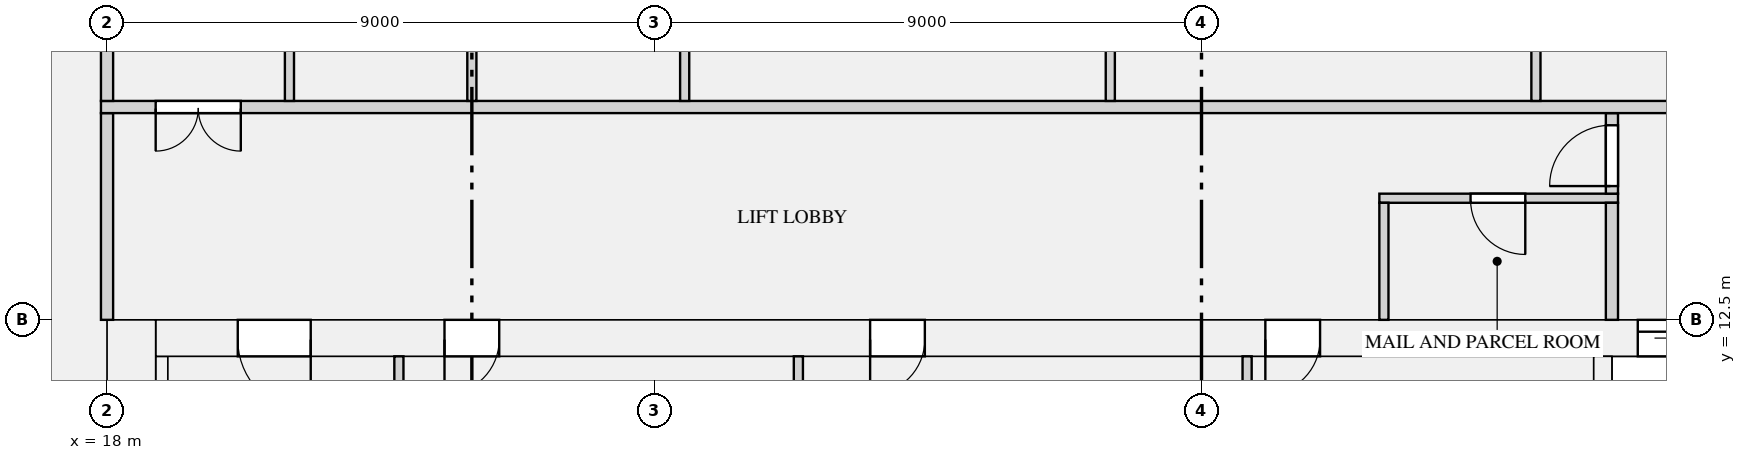
"""IFC4 building model, lengths in metres.
Left out: names, types, materials, properties, quantities, classifications, styles, units other than length and angle.
Written with IfcOpenShell. Run it as: python <this file> out.ifc"""

import sys

from ifc_helpers import new_model, si_unit, direction, frame, frame_2d, origin, place, context, subcontext, project, spatial, rectangle, extrude, element, fill, save


model = new_model("IFC4")
c1 = context("Model", 3, precision=1e-05, world=origin(), true_north=direction((0.0, 1.0)))
c2 = subcontext(c1, "Body", "Model", "MODEL_VIEW")
j1 = project(units=[si_unit("LENGTHUNIT", "METRE"), si_unit("PLANEANGLEUNIT", "RADIAN")], contexts=[c1])
p1 = place(None, origin())
s1 = spatial("IfcSite", under=j1, at=p1, CompositionType="ELEMENT")
p2 = place(p1, origin())
s2 = spatial("IfcBuilding", under=s1, at=p2, CompositionType="ELEMENT")
p3 = place(p2, frame((0.0, 0.0, 127.65)))
s3 = spatial("IfcBuildingStorey", under=s2, at=p3, CompositionType="ELEMENT", Elevation=127.65)
p4 = place(p3, frame((18.4, 0.0, 0.0), z_axis=(0.0, 0.0, 1.0), x_axis=(0.0, 1.0, 0.0)))
e1 = element("IfcWall", 1, at=p4, inside=s3, PredefinedType="SHEAR", context=c2, shape_type="SweptSolid", body=[
    extrude(rectangle(XDim=12.5, YDim=0.8, at=frame_2d((6.25, 0.0))), origin(), (0.0, 0.0, 1.0), 3.15),
])
p5 = place(p3, frame((18.8, 12.2, 0.0), z_axis=(0.0, 0.0, 1.0), x_axis=(1.0, 0.0, 0.0)))
e2 = element("IfcWall", 2, at=p5, inside=s3, PredefinedType="SHEAR", context=c2, shape_type="SweptSolid", body=[
    extrude(rectangle(XDim=34.4, YDim=0.6, at=frame_2d((17.2, 0.0))), origin(), (0.0, 0.0, 1.0), 3.15),
])
p6 = place(p5, frame((24.375, 0.0, 0.0)))
e3 = element("IfcOpeningElement", 3, at=p6, cuts=e2, PredefinedType="OPENING", context=c2, shape_type="SweptSolid", body=[
    extrude(rectangle(XDim=1.1, YDim=2.1, at=frame_2d((0.55, 1.05))), frame((0.0, 0.31, 0.0), z_axis=(0.0, -1.0, 0.0), x_axis=(1.0, 0.0, 0.0)), (0.0, 0.0, 1.0), 0.62),
])
p7 = place(p5, frame((26.625, 0.0, 0.0)))
e4 = element("IfcOpeningElement", 4, at=p7, cuts=e2, PredefinedType="OPENING", context=c2, shape_type="SweptSolid", body=[
    extrude(rectangle(XDim=1.1, YDim=2.1, at=frame_2d((0.55, 1.05))), frame((0.0, 0.31, 0.0), z_axis=(0.0, -1.0, 0.0), x_axis=(1.0, 0.0, 0.0)), (0.0, 0.0, 1.0), 0.62),
])
p8 = place(p5, frame((28.875, 0.0, 0.0)))
e5 = element("IfcOpeningElement", 5, at=p8, cuts=e2, PredefinedType="OPENING", context=c2, shape_type="SweptSolid", body=[
    extrude(rectangle(XDim=1.1, YDim=2.1, at=frame_2d((0.55, 1.05))), frame((0.0, 0.31, 0.0), z_axis=(0.0, -1.0, 0.0), x_axis=(1.0, 0.0, 0.0)), (0.0, 0.0, 1.0), 0.62),
])
p9 = place(p5, frame((4.75, 0.0, 0.0)))
e6 = element("IfcOpeningElement", 6, at=p9, cuts=e2, PredefinedType="OPENING", context=c2, shape_type="SweptSolid", body=[
    extrude(rectangle(XDim=0.9, YDim=2.1, at=frame_2d((0.45, 1.05))), frame((0.0, 0.31, 0.0), z_axis=(0.0, -1.0, 0.0), x_axis=(1.0, 0.0, 0.0)), (0.0, 0.0, 1.0), 0.62),
])
p10 = place(p5, frame((11.75, 0.0, 0.0)))
e7 = element("IfcOpeningElement", 7, at=p10, cuts=e2, PredefinedType="OPENING", context=c2, shape_type="SweptSolid", body=[
    extrude(rectangle(XDim=0.9, YDim=2.1, at=frame_2d((0.45, 1.05))), frame((0.0, 0.31, 0.0), z_axis=(0.0, -1.0, 0.0), x_axis=(1.0, 0.0, 0.0)), (0.0, 0.0, 1.0), 0.62),
])
p11 = place(p5, frame((18.25, 0.0, 0.0)))
e8 = element("IfcOpeningElement", 8, at=p11, cuts=e2, PredefinedType="OPENING", context=c2, shape_type="SweptSolid", body=[
    extrude(rectangle(XDim=0.9, YDim=2.1, at=frame_2d((0.45, 1.05))), frame((0.0, 0.31, 0.0), z_axis=(0.0, -1.0, 0.0), x_axis=(1.0, 0.0, 0.0)), (0.0, 0.0, 1.0), 0.62),
])
p12 = place(p5, frame((1.35, 0.0, 0.0)))
e9 = element("IfcOpeningElement", 9, at=p12, cuts=e2, PredefinedType="OPENING", context=c2, shape_type="SweptSolid", body=[
    extrude(rectangle(XDim=1.2, YDim=2.1, at=frame_2d((0.6, 1.05))), frame((0.0, 0.31, 0.0), z_axis=(0.0, -1.0, 0.0), x_axis=(1.0, 0.0, 0.0)), (0.0, 0.0, 1.0), 0.62),
])
p13 = place(p5, frame((31.85, 0.0, 0.0)))
e10 = element("IfcOpeningElement", 10, at=p13, cuts=e2, PredefinedType="OPENING", context=c2, shape_type="SweptSolid", body=[
    extrude(rectangle(XDim=1.2, YDim=2.1, at=frame_2d((0.6, 1.05))), frame((0.0, 0.31, 0.0), z_axis=(0.0, -1.0, 0.0), x_axis=(1.0, 0.0, 0.0)), (0.0, 0.0, 1.0), 0.62),
])
p14 = place(p3, frame((18.9, 1.0, 0.0), z_axis=(0.0, 0.0, 1.0), x_axis=(0.0, 1.0, 0.0)))
e11 = element("IfcWall", 11, at=p14, inside=s3, PredefinedType="SHEAR", context=c2, shape_type="SweptSolid", body=[
    extrude(rectangle(XDim=10.9, YDim=0.2, at=frame_2d((5.45, 0.0))), origin(), (0.0, 0.0, 1.0), 3.15),
])
p15 = place(p3, frame((42.6, 8.25, 0.0), z_axis=(0.0, 0.0, 1.0), x_axis=(0.0, 1.0, 0.0)))
e12 = element("IfcWall", 12, at=p15, inside=s3, PredefinedType="SHEAR", context=c2, shape_type="SweptSolid", body=[
    extrude(rectangle(XDim=3.65, YDim=0.3, at=frame_2d((1.825, 0.0))), origin(), (0.0, 0.0, 1.0), 3.15),
])
p16 = place(p3, frame((38.925, 14.5, 0.0), z_axis=(0.0, 0.0, 1.0), x_axis=(1.0, 0.0, 0.0)))
e13 = element("IfcWall", 13, at=p16, inside=s3, PredefinedType="PARTITIONING", context=c2, shape_type="SweptSolid", body=[
    extrude(rectangle(XDim=3.925, YDim=0.15, at=frame_2d((1.962, 0.0))), origin(), (0.0, 0.0, 1.0), 2.65),
])
p17 = place(p16, frame((1.5, 0.0, 0.0)))
e14 = element("IfcOpeningElement", 14, at=p17, cuts=e13, PredefinedType="OPENING", context=c2, shape_type="SweptSolid", body=[
    extrude(rectangle(XDim=0.9, YDim=2.1, at=frame_2d((0.45, 1.05))), frame((0.0, 0.085, 0.0), z_axis=(0.0, -1.0, 0.0), x_axis=(1.0, 0.0, 0.0)), (0.0, 0.0, 1.0), 0.17),
])
for number, where, z_axis, x_axis in (
    (15, (22.8, 9.505, 0.0), (0.0, 0.0, 1.0), (0.0, 1.0, 0.0)),
    (16, (29.37, 9.505, 0.0), (0.0, 0.0, 1.0), (0.0, 1.0, 0.0)),
    (17, (36.75, 9.505, 0.0), (0.0, 0.0, 1.0), (0.0, 1.0, 0.0)),
):
    element("IfcWall", number, at=place(p3, frame(where, z_axis=z_axis, x_axis=x_axis)), inside=s3, PredefinedType="PARTITIONING", context=c2, shape_type="SweptSolid", body=[
        extrude(rectangle(XDim=2.395, YDim=0.15, at=frame_2d((1.198, 0.0))), origin(), (0.0, 0.0, 1.0), 2.65),
    ])
p18 = place(p3, frame((18.0, 12.5, 0.0), z_axis=(0.0, 0.0, 1.0), x_axis=(0.0, 1.0, 0.0)))
e18 = element("IfcWall", 18, at=p18, inside=s3, PredefinedType="PARTITIONING", context=c2, shape_type="SweptSolid", body=[
    extrude(rectangle(XDim=3.4, YDim=0.2, at=frame_2d((1.7, 0.0))), origin(), (0.0, 0.0, 1.0), 2.65),
])
p19 = place(p3, frame((39.0, 12.5, 0.0), z_axis=(0.0, 0.0, 1.0), x_axis=(0.0, 1.0, 0.0)))
e19 = element("IfcWall", 19, at=p19, inside=s3, PredefinedType="PARTITIONING", context=c2, shape_type="SweptSolid", body=[
    extrude(rectangle(XDim=1.925, YDim=0.15, at=frame_2d((0.962, 0.0))), origin(), (0.0, 0.0, 1.0), 2.65),
])
p20 = place(p3, frame((42.75, 12.5, 0.0), z_axis=(0.0, 0.0, 1.0), x_axis=(0.0, 1.0, 0.0)))
e20 = element("IfcWall", 20, at=p20, inside=s3, PredefinedType="PARTITIONING", context=c2, shape_type="SweptSolid", body=[
    extrude(rectangle(XDim=1.925, YDim=0.2, at=frame_2d((0.962, 0.0))), origin(), (0.0, 0.0, 1.0), 2.65),
])
p21 = place(p3, frame((42.75, 14.575, 0.0), z_axis=(0.0, 0.0, 1.0), x_axis=(0.0, 1.0, 0.0)))
e21 = element("IfcWall", 21, at=p21, inside=s3, PredefinedType="PARTITIONING", context=c2, shape_type="SweptSolid", body=[
    extrude(rectangle(XDim=1.325, YDim=0.2, at=frame_2d((0.663, 0.0))), origin(), (0.0, 0.0, 1.0), 2.65),
])
p22 = place(p21, frame((0.125, 0.0, 0.0)))
e22 = element("IfcOpeningElement", 22, at=p22, cuts=e21, PredefinedType="OPENING", context=c2, shape_type="SweptSolid", body=[
    extrude(rectangle(XDim=1.0, YDim=2.1, at=frame_2d((0.5, 1.05))), frame((0.0, 0.11, 0.0), z_axis=(0.0, -1.0, 0.0), x_axis=(1.0, 0.0, 0.0)), (0.0, 0.0, 1.0), 0.22),
])
p23 = place(p3, frame((17.9, 16.0, 0.0), z_axis=(0.0, 0.0, 1.0), x_axis=(1.0, 0.0, 0.0)))
e23 = element("IfcWall", 23, at=p23, inside=s3, PredefinedType="PARTITIONING", context=c2, shape_type="SweptSolid", body=[
    extrude(rectangle(XDim=36.2, YDim=0.2, at=frame_2d((18.1, 0.0))), origin(), (0.0, 0.0, 1.0), 2.65),
])
p24 = place(p23, frame((0.9, 0.0, 0.0)))
e24 = element("IfcOpeningElement", 24, at=p24, cuts=e23, PredefinedType="OPENING", context=c2, shape_type="SweptSolid", body=[
    extrude(rectangle(XDim=1.4, YDim=2.1, at=frame_2d((0.7, 1.05))), frame((0.0, 0.11, 0.0), z_axis=(0.0, -1.0, 0.0), x_axis=(1.0, 0.0, 0.0)), (0.0, 0.0, 1.0), 0.22),
])
p25 = place(p23, frame((33.9, 0.0, 0.0)))
e25 = element("IfcOpeningElement", 25, at=p25, cuts=e23, PredefinedType="OPENING", context=c2, shape_type="SweptSolid", body=[
    extrude(rectangle(XDim=1.4, YDim=2.1, at=frame_2d((0.7, 1.05))), frame((0.0, 0.11, 0.0), z_axis=(0.0, -1.0, 0.0), x_axis=(1.0, 0.0, 0.0)), (0.0, 0.0, 1.0), 0.22),
])
p26 = place(p3, frame((18.0, 16.1, 0.0), z_axis=(0.0, 0.0, 1.0), x_axis=(0.0, 1.0, 0.0)))
e26 = element("IfcWall", 26, at=p26, inside=s3, PredefinedType="PARTITIONING", context=c2, shape_type="SweptSolid", body=[
    extrude(rectangle(XDim=7.8, YDim=0.2, at=frame_2d((3.9, 0.0))), origin(), (0.0, 0.0, 1.0), 2.65),
])
p27 = place(p26, frame((2.35, 0.0, 0.0)))
e27 = element("IfcOpeningElement", 27, at=p27, cuts=e26, PredefinedType="OPENING", context=c2, shape_type="SweptSolid", body=[
    extrude(rectangle(XDim=1.1, YDim=2.1, at=frame_2d((0.55, 1.05))), frame((0.0, 0.11, 0.0), z_axis=(0.0, -1.0, 0.0), x_axis=(1.0, 0.0, 0.0)), (0.0, 0.0, 1.0), 0.22),
])
p28 = place(p3, frame((21.0, 16.1, 0.0), z_axis=(0.0, 0.0, 1.0), x_axis=(0.0, 1.0, 0.0)))
e28 = element("IfcWall", 28, at=p28, inside=s3, PredefinedType="PARTITIONING", context=c2, shape_type="SweptSolid", body=[
    extrude(rectangle(XDim=4.825, YDim=0.15, at=frame_2d((2.413, 0.0))), origin(), (0.0, 0.0, 1.0), 2.65),
])
p29 = place(p28, frame((1.95, 0.0, 0.0)))
e29 = element("IfcOpeningElement", 29, at=p29, cuts=e28, PredefinedType="OPENING", context=c2, shape_type="SweptSolid", body=[
    extrude(rectangle(XDim=0.9, YDim=2.1, at=frame_2d((0.45, 1.05))), frame((0.0, 0.085, 0.0), z_axis=(0.0, -1.0, 0.0), x_axis=(1.0, 0.0, 0.0)), (0.0, 0.0, 1.0), 0.17),
])
for number, where, z_axis, x_axis in (
    (30, (24.0, 16.1, 0.0), (0.0, 0.0, 1.0), (0.0, 1.0, 0.0)),
    (31, (27.5, 16.1, 0.0), (0.0, 0.0, 1.0), (0.0, 1.0, 0.0)),
    (32, (34.5, 16.1, 0.0), (0.0, 0.0, 1.0), (0.0, 1.0, 0.0)),
    (33, (41.5, 16.1, 0.0), (0.0, 0.0, 1.0), (0.0, 1.0, 0.0)),
):
    element("IfcWall", number, at=place(p3, frame(where, z_axis=z_axis, x_axis=x_axis)), inside=s3, PredefinedType="PARTITIONING", context=c2, shape_type="SweptSolid", body=[
        extrude(rectangle(XDim=4.825, YDim=0.15, at=frame_2d((2.413, 0.0))), origin(), (0.0, 0.0, 1.0), 2.65),
    ])
p30 = place(p6, origin())
e34 = element("IfcDoor", 34, at=p30, inside=s3, OperationType="DOUBLE_DOOR_SLIDING", PredefinedType="DOOR", context=c2, shape_type="SweptSolid", body=[
    extrude(rectangle(XDim=1.1, YDim=2.1, at=frame_2d((0.55, 1.05))), frame((0.0, 0.025, 0.0), z_axis=(0.0, -1.0, 0.0), x_axis=(1.0, 0.0, 0.0)), (0.0, 0.0, 1.0), 0.05),
])
fill(e3, e34)
p31 = place(p17, frame((0.9, 0.0, 0.0), z_axis=(0.0, 0.0, 1.0), x_axis=(-1.0, 0.0, 0.0)))
e35 = element("IfcDoor", 35, at=p31, inside=s3, OperationType="SINGLE_SWING_LEFT", PredefinedType="DOOR", context=c2, shape_type="SweptSolid", body=[
    extrude(rectangle(XDim=0.9, YDim=2.1, at=frame_2d((0.45, 1.05))), frame((0.0, 0.025, 0.0), z_axis=(0.0, -1.0, 0.0), x_axis=(1.0, 0.0, 0.0)), (0.0, 0.0, 1.0), 0.05),
])
fill(e14, e35)
p32 = place(p9, frame((0.9, 0.0, 0.0), z_axis=(0.0, 0.0, 1.0), x_axis=(-1.0, 0.0, 0.0)))
e36 = element("IfcDoor", 36, at=p32, inside=s3, OperationType="SINGLE_SWING_RIGHT", PredefinedType="DOOR", context=c2, shape_type="SweptSolid", body=[
    extrude(rectangle(XDim=0.9, YDim=2.1, at=frame_2d((0.45, 1.05))), frame((0.0, 0.025, 0.0), z_axis=(0.0, -1.0, 0.0), x_axis=(1.0, 0.0, 0.0)), (0.0, 0.0, 1.0), 0.05),
])
fill(e6, e36)
p33 = place(p10, frame((0.9, 0.0, 0.0), z_axis=(0.0, 0.0, 1.0), x_axis=(-1.0, 0.0, 0.0)))
e37 = element("IfcDoor", 37, at=p33, inside=s3, OperationType="SINGLE_SWING_RIGHT", PredefinedType="DOOR", context=c2, shape_type="SweptSolid", body=[
    extrude(rectangle(XDim=0.9, YDim=2.1, at=frame_2d((0.45, 1.05))), frame((0.0, 0.025, 0.0), z_axis=(0.0, -1.0, 0.0), x_axis=(1.0, 0.0, 0.0)), (0.0, 0.0, 1.0), 0.05),
])
fill(e7, e37)
p34 = place(p11, frame((0.9, 0.0, 0.0), z_axis=(0.0, 0.0, 1.0), x_axis=(-1.0, 0.0, 0.0)))
e38 = element("IfcDoor", 38, at=p34, inside=s3, OperationType="SINGLE_SWING_RIGHT", PredefinedType="DOOR", context=c2, shape_type="SweptSolid", body=[
    extrude(rectangle(XDim=0.9, YDim=2.1, at=frame_2d((0.45, 1.05))), frame((0.0, 0.025, 0.0), z_axis=(0.0, -1.0, 0.0), x_axis=(1.0, 0.0, 0.0)), (0.0, 0.0, 1.0), 0.05),
])
fill(e8, e38)
p35 = place(p12, frame((1.2, 0.0, 0.0), z_axis=(0.0, 0.0, 1.0), x_axis=(-1.0, 0.0, 0.0)))
e39 = element("IfcDoor", 39, at=p35, inside=s3, OperationType="SINGLE_SWING_LEFT", PredefinedType="DOOR", context=c2, shape_type="SweptSolid", body=[
    extrude(rectangle(XDim=1.2, YDim=2.1, at=frame_2d((0.6, 1.05))), frame((0.0, 0.025, 0.0), z_axis=(0.0, -1.0, 0.0), x_axis=(1.0, 0.0, 0.0)), (0.0, 0.0, 1.0), 0.05),
])
fill(e9, e39)
p36 = place(p22, origin())
e40 = element("IfcDoor", 40, at=p36, inside=s3, OperationType="SINGLE_SWING_LEFT", PredefinedType="DOOR", context=c2, shape_type="SweptSolid", body=[
    extrude(rectangle(XDim=1.0, YDim=2.1, at=frame_2d((0.5, 1.05))), frame((0.0, 0.025, 0.0), z_axis=(0.0, -1.0, 0.0), x_axis=(1.0, 0.0, 0.0)), (0.0, 0.0, 1.0), 0.05),
])
fill(e22, e40)
p37 = place(p24, frame((1.4, 0.0, 0.0), z_axis=(0.0, 0.0, 1.0), x_axis=(-1.0, 0.0, 0.0)))
e41 = element("IfcDoor", 41, at=p37, inside=s3, OperationType="DOUBLE_DOOR_SINGLE_SWING", PredefinedType="DOOR", context=c2, shape_type="SweptSolid", body=[
    extrude(rectangle(XDim=1.4, YDim=2.1, at=frame_2d((0.7, 1.05))), frame((0.0, 0.025, 0.0), z_axis=(0.0, -1.0, 0.0), x_axis=(1.0, 0.0, 0.0)), (0.0, 0.0, 1.0), 0.05),
])
fill(e24, e41)
save(model, sys.argv[1])
